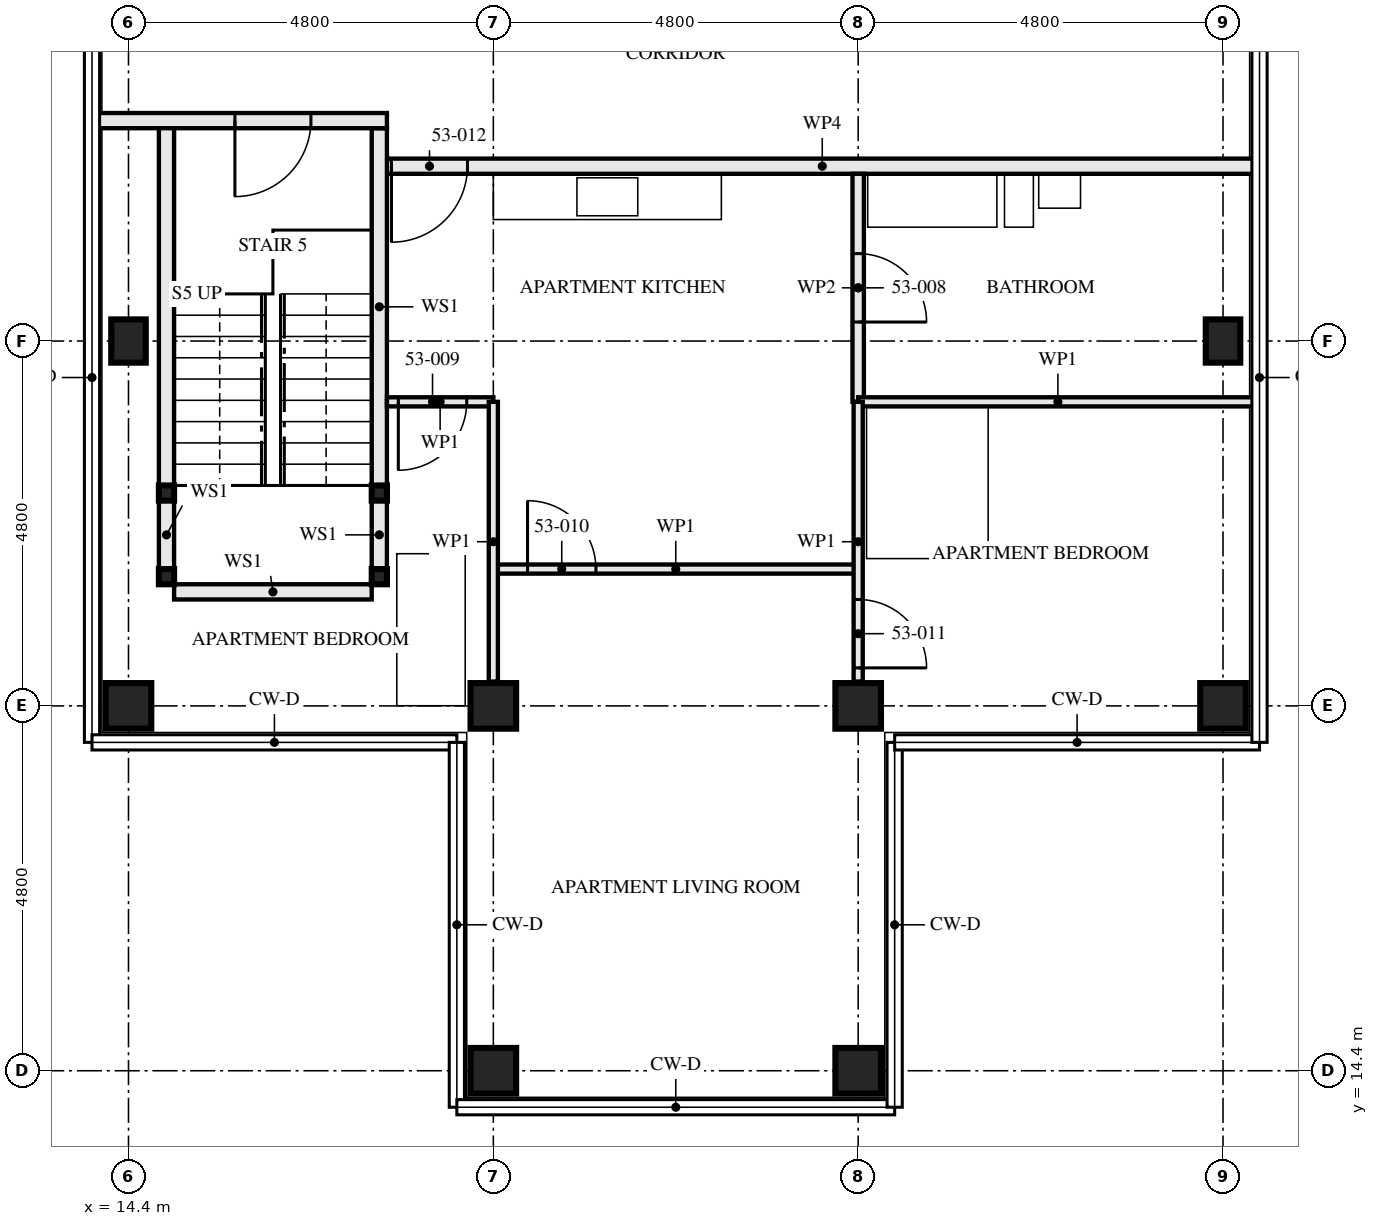
"""IFC4 building model, lengths in metres.
Left out: names, types, materials, properties, quantities, classifications, styles, units other than length and angle.
Written with IfcOpenShell. Run it as: python <this file> out.ifc"""

import sys

from ifc_helpers import new_model, si_unit, direction, frame, frame_2d, origin, origin_2d, place, context, subcontext, project, spatial, rectangle, hollow_rectangle, i_section, extrude, element, fill, save


model = new_model("IFC4")
c1 = context("Model", 3, precision=1e-05, world=origin(), true_north=direction((0.0, 1.0)))
c2 = subcontext(c1, "Body", "Model", "MODEL_VIEW")
j1 = project(units=[si_unit("LENGTHUNIT", "METRE"), si_unit("PLANEANGLEUNIT", "RADIAN")], contexts=[c1])
p1 = place(None, origin())
s1 = spatial("IfcSite", under=j1, at=p1, CompositionType="ELEMENT")
p2 = place(p1, origin())
s2 = spatial("IfcBuilding", under=s1, at=p2, CompositionType="ELEMENT")
p3 = place(p2, frame((0.0, 0.0, 194.5)))
s3 = spatial("IfcBuildingStorey", under=s2, at=p3, CompositionType="ELEMENT", Elevation=194.5)
p4 = place(p3, frame((14.4, 19.2, 0.0), z_axis=(0.0, 0.0, 1.0), x_axis=(0.0, 1.0, 0.0)))
e1 = element("IfcColumn", 1, at=p4, inside=s3, PredefinedType="COLUMN", context=c2, shape_type="SweptSolid", body=[
    extrude(hollow_rectangle(XDim=0.6, YDim=0.6, WallThickness=0.05, at=origin_2d()), origin(), (0.0, 0.0, 1.0), 3.5),
])
p5 = place(p3, frame((14.4, 24.0, 0.0), z_axis=(0.0, 0.0, 1.0), x_axis=(1.0, 0.0, 0.0)))
e2 = element("IfcColumn", 2, at=p5, inside=s3, PredefinedType="COLUMN", context=c2, shape_type="SweptSolid", body=[
    extrude(i_section(OverallWidth=0.454, OverallDepth=0.569, WebThickness=0.078, FlangeThickness=0.125, FilletRadius=0.015, at=origin_2d()), origin(), (0.0, 0.0, 1.0), 3.5),
])
for number, where, z_axis, x_axis in (
    (3, (19.2, 14.4, 0.0), (0.0, 0.0, 1.0), (0.0, 1.0, 0.0)),
    (4, (19.2, 19.2, 0.0), (0.0, 0.0, 1.0), (0.0, 1.0, 0.0)),
    (5, (24.0, 14.4, 0.0), (0.0, 0.0, 1.0), (0.0, 1.0, 0.0)),
    (6, (24.0, 19.2, 0.0), (0.0, 0.0, 1.0), (0.0, 1.0, 0.0)),
    (7, (28.8, 19.2, 0.0), (0.0, 0.0, 1.0), (0.0, 1.0, 0.0)),
):
    element("IfcColumn", number, at=place(p3, frame(where, z_axis=z_axis, x_axis=x_axis)), inside=s3, PredefinedType="COLUMN", context=c2, shape_type="SweptSolid", body=[
        extrude(hollow_rectangle(XDim=0.6, YDim=0.6, WallThickness=0.05, at=origin_2d()), origin(), (0.0, 0.0, 1.0), 3.5),
    ])
p6 = place(p3, frame((28.8, 24.0, 0.0), z_axis=(0.0, 0.0, 1.0), x_axis=(1.0, 0.0, 0.0)))
e8 = element("IfcColumn", 8, at=p6, inside=s3, PredefinedType="COLUMN", context=c2, shape_type="SweptSolid", body=[
    extrude(i_section(OverallWidth=0.454, OverallDepth=0.569, WebThickness=0.078, FlangeThickness=0.125, FilletRadius=0.015, at=origin_2d()), origin(), (0.0, 0.0, 1.0), 3.5),
])
for number, where, z_axis, x_axis in (
    (9, (14.9, 20.9, 0.0), (0.0, 0.0, 1.0), (1.0, 0.0, 0.0)),
    (10, (17.7, 20.9, 0.0), (0.0, 0.0, 1.0), (1.0, 0.0, 0.0)),
    (11, (14.9, 22.0, 0.0), (0.0, 0.0, 1.0), (1.0, 0.0, 0.0)),
    (12, (17.7, 22.0, 0.0), (0.0, 0.0, 1.0), (1.0, 0.0, 0.0)),
):
    element("IfcColumn", number, at=place(p3, frame(where, z_axis=z_axis, x_axis=x_axis)), inside=s3, PredefinedType="COLUMN", context=c2, shape_type="SweptSolid", body=[
        extrude(hollow_rectangle(XDim=0.2, YDim=0.2, WallThickness=0.008, at=origin_2d()), origin(), (0.0, 0.0, 1.0), 3.33),
    ])
p7 = place(p3, frame((14.9, 21.0, 0.0), z_axis=(0.0, 0.0, 1.0), x_axis=(0.0, 1.0, 0.0)))
e13 = element("IfcWall", 13, at=p7, inside=s3, PredefinedType="SOLIDWALL", context=c2, shape_type="SweptSolid", body=[
    extrude(rectangle(XDim=0.9, YDim=0.2, at=frame_2d((0.45, 0.0))), origin(), (0.0, 0.0, 1.0), 2.99),
])
p8 = place(p3, frame((14.9, 22.1, 0.0), z_axis=(0.0, 0.0, 1.0), x_axis=(0.0, 1.0, 0.0)))
e14 = element("IfcWall", 14, at=p8, inside=s3, PredefinedType="SOLIDWALL", context=c2, shape_type="SweptSolid", body=[
    extrude(rectangle(XDim=4.7, YDim=0.2, at=frame_2d((2.35, 0.0))), origin(), (0.0, 0.0, 1.0), 2.99),
])
p9 = place(p3, frame((17.7, 21.0, 0.0), z_axis=(0.0, 0.0, 1.0), x_axis=(0.0, 1.0, 0.0)))
e15 = element("IfcWall", 15, at=p9, inside=s3, PredefinedType="SOLIDWALL", context=c2, shape_type="SweptSolid", body=[
    extrude(rectangle(XDim=0.9, YDim=0.2, at=frame_2d((0.45, 0.0))), origin(), (0.0, 0.0, 1.0), 2.99),
])
p10 = place(p3, frame((17.7, 22.1, 0.0), z_axis=(0.0, 0.0, 1.0), x_axis=(0.0, 1.0, 0.0)))
e16 = element("IfcWall", 16, at=p10, inside=s3, PredefinedType="SOLIDWALL", context=c2, shape_type="SweptSolid", body=[
    extrude(rectangle(XDim=4.7, YDim=0.2, at=frame_2d((2.35, 0.0))), origin(), (0.0, 0.0, 1.0), 2.99),
])
p11 = place(p3, frame((15.0, 20.7, 0.0), z_axis=(0.0, 0.0, 1.0), x_axis=(1.0, 0.0, 0.0)))
e17 = element("IfcWall", 17, at=p11, inside=s3, PredefinedType="SOLIDWALL", context=c2, shape_type="SweptSolid", body=[
    extrude(rectangle(XDim=2.6, YDim=0.2, at=frame_2d((1.3, 0.0))), origin(), (0.0, 0.0, 1.0), 3.33),
])
p12 = place(p3, frame((13.945, 26.9, 0.0), z_axis=(0.0, 0.0, 1.0), x_axis=(1.0, 0.0, 0.0)))
e18 = element("IfcWall", 18, at=p12, inside=s3, PredefinedType="SOLIDWALL", context=c2, shape_type="SweptSolid", body=[
    extrude(rectangle(XDim=3.855, YDim=0.2, at=frame_2d((1.927, 0.0))), origin(), (0.0, 0.0, 1.0), 2.32),
])
p13 = place(p12, frame((1.855, 0.0, 0.0)))
e19 = element("IfcOpeningElement", 19, at=p13, cuts=e18, PredefinedType="OPENING", context=c2, shape_type="SweptSolid", body=[
    extrude(rectangle(XDim=1.0, YDim=2.1, at=frame_2d((0.5, 1.05))), frame((0.0, 0.111, 0.0), z_axis=(0.0, -1.0, 0.0), x_axis=(1.0, 0.0, 0.0)), (0.0, 0.0, 1.0), 0.221),
])
p14 = place(p3, frame((24.0, 23.2, 0.0), z_axis=(0.0, 0.0, 1.0), x_axis=(0.0, 1.0, 0.0)))
e20 = element("IfcWall", 20, at=p14, inside=s3, PredefinedType="PARTITIONING", context=c2, shape_type="SweptSolid", body=[
    extrude(rectangle(XDim=3.0, YDim=0.15, at=frame_2d((1.5, 0.0))), origin(), (0.0, 0.0, 1.0), 2.55),
])
p15 = place(p14, frame((1.05, 0.0, 0.0)))
e21 = element("IfcOpeningElement", 21, at=p15, cuts=e20, PredefinedType="OPENING", context=c2, shape_type="SweptSolid", body=[
    extrude(rectangle(XDim=0.9, YDim=2.1, at=frame_2d((0.45, 1.05))), frame((0.0, 0.085, 0.0), z_axis=(0.0, -1.0, 0.0), x_axis=(1.0, 0.0, 0.0)), (0.0, 0.0, 1.0), 0.171),
])
p16 = place(p3, frame((17.8, 23.2, 0.0), z_axis=(0.0, 0.0, 1.0), x_axis=(1.0, 0.0, 0.0)))
e22 = element("IfcWall", 22, at=p16, inside=s3, PredefinedType="PARTITIONING", context=c2, shape_type="SweptSolid", body=[
    extrude(rectangle(XDim=1.4, YDim=0.12, at=frame_2d((0.7, 0.0))), origin(), (0.0, 0.0, 1.0), 3.33),
])
p17 = place(p16, frame((0.15, 0.0, 0.0)))
e23 = element("IfcOpeningElement", 23, at=p17, cuts=e22, PredefinedType="OPENING", context=c2, shape_type="SweptSolid", body=[
    extrude(rectangle(XDim=0.9, YDim=2.1, at=frame_2d((0.45, 1.05))), frame((0.0, 0.071, 0.0), z_axis=(0.0, -1.0, 0.0), x_axis=(1.0, 0.0, 0.0)), (0.0, 0.0, 1.0), 0.141),
])
p18 = place(p3, frame((19.2, 21.0, 0.0), z_axis=(0.0, 0.0, 1.0), x_axis=(1.0, 0.0, 0.0)))
e24 = element("IfcWall", 24, at=p18, inside=s3, PredefinedType="PARTITIONING", context=c2, shape_type="SweptSolid", body=[
    extrude(rectangle(XDim=4.8, YDim=0.12, at=frame_2d((2.4, 0.0))), origin(), (0.0, 0.0, 1.0), 3.33),
])
p19 = place(p18, frame((0.45, 0.0, 0.0)))
e25 = element("IfcOpeningElement", 25, at=p19, cuts=e24, PredefinedType="OPENING", context=c2, shape_type="SweptSolid", body=[
    extrude(rectangle(XDim=0.9, YDim=2.1, at=frame_2d((0.45, 1.05))), frame((0.0, 0.071, 0.0), z_axis=(0.0, -1.0, 0.0), x_axis=(1.0, 0.0, 0.0)), (0.0, 0.0, 1.0), 0.141),
])
p20 = place(p3, frame((24.0, 23.2, 0.0), z_axis=(0.0, 0.0, 1.0), x_axis=(1.0, 0.0, 0.0)))
e26 = element("IfcWall", 26, at=p20, inside=s3, PredefinedType="PARTITIONING", context=c2, shape_type="SweptSolid", body=[
    extrude(rectangle(XDim=5.255, YDim=0.12, at=frame_2d((2.627, 0.0))), origin(), (0.0, 0.0, 1.0), 2.32),
])
p21 = place(p3, frame((19.2, 19.52, 0.0), z_axis=(0.0, 0.0, 1.0), x_axis=(0.0, 1.0, 0.0)))
e27 = element("IfcWall", 27, at=p21, inside=s3, PredefinedType="PARTITIONING", context=c2, shape_type="SweptSolid", body=[
    extrude(rectangle(XDim=3.68, YDim=0.12, at=frame_2d((1.84, 0.0))), origin(), (0.0, 0.0, 1.0), 2.55),
])
p22 = place(p3, frame((24.0, 19.52, 0.0), z_axis=(0.0, 0.0, 1.0), x_axis=(0.0, 1.0, 0.0)))
e28 = element("IfcWall", 28, at=p22, inside=s3, PredefinedType="PARTITIONING", context=c2, shape_type="SweptSolid", body=[
    extrude(rectangle(XDim=3.68, YDim=0.12, at=frame_2d((1.84, 0.0))), origin(), (0.0, 0.0, 1.0), 3.33),
])
p23 = place(p22, frame((0.18, 0.0, 0.0)))
e29 = element("IfcOpeningElement", 29, at=p23, cuts=e28, PredefinedType="OPENING", context=c2, shape_type="SweptSolid", body=[
    extrude(rectangle(XDim=0.9, YDim=2.1, at=frame_2d((0.45, 1.05))), frame((0.0, 0.071, 0.0), z_axis=(0.0, -1.0, 0.0), x_axis=(1.0, 0.0, 0.0)), (0.0, 0.0, 1.0), 0.141),
])
p24 = place(p3, frame((17.8, 26.3, 0.0), z_axis=(0.0, 0.0, 1.0), x_axis=(1.0, 0.0, 0.0)))
e30 = element("IfcWall", 30, at=p24, inside=s3, PredefinedType="PARTITIONING", context=c2, shape_type="SweptSolid", body=[
    extrude(rectangle(XDim=11.455, YDim=0.2, at=frame_2d((5.728, 0.0))), origin(), (0.0, 0.0, 1.0), 2.32),
])
p25 = place(p24, frame((0.06, 0.0, 0.0)))
e31 = element("IfcOpeningElement", 31, at=p25, cuts=e30, PredefinedType="OPENING", context=c2, shape_type="SweptSolid", body=[
    extrude(rectangle(XDim=1.0, YDim=2.1, at=frame_2d((0.5, 1.05))), frame((0.0, 0.111, 0.0), z_axis=(0.0, -1.0, 0.0), x_axis=(1.0, 0.0, 0.0)), (0.0, 0.0, 1.0), 0.221),
])
p26 = place(p13, frame((1.0, 0.0, 0.0), z_axis=(0.0, 0.0, 1.0), x_axis=(-1.0, 0.0, 0.0)))
e32 = element("IfcDoor", 32, at=p26, inside=s3, OperationType="SINGLE_SWING_LEFT", PredefinedType="DOOR", context=c2, shape_type="SweptSolid", body=[
    extrude(rectangle(XDim=1.0, YDim=2.1, at=frame_2d((0.5, 1.05))), frame((0.0, 0.032, 0.0), z_axis=(0.0, -1.0, 0.0), x_axis=(1.0, 0.0, 0.0)), (0.0, 0.0, 1.0), 0.064),
])
fill(e19, e32)
p27 = place(p15, frame((0.9, 0.0, 0.0), z_axis=(0.0, 0.0, 1.0), x_axis=(-1.0, 0.0, 0.0)))
e33 = element("IfcDoor", 33, at=p27, inside=s3, OperationType="SINGLE_SWING_LEFT", PredefinedType="DOOR", context=c2, shape_type="SweptSolid", body=[
    extrude(rectangle(XDim=0.9, YDim=2.1, at=frame_2d((0.45, 1.05))), frame((0.0, 0.022, 0.0), z_axis=(0.0, -1.0, 0.0), x_axis=(1.0, 0.0, 0.0)), (0.0, 0.0, 1.0), 0.044),
])
fill(e21, e33)
p28 = place(p17, frame((0.9, 0.0, 0.0), z_axis=(0.0, 0.0, 1.0), x_axis=(-1.0, 0.0, 0.0)))
e34 = element("IfcDoor", 34, at=p28, inside=s3, OperationType="SINGLE_SWING_LEFT", PredefinedType="DOOR", context=c2, shape_type="SweptSolid", body=[
    extrude(rectangle(XDim=0.9, YDim=2.1, at=frame_2d((0.45, 1.05))), frame((0.0, 0.022, 0.0), z_axis=(0.0, -1.0, 0.0), x_axis=(1.0, 0.0, 0.0)), (0.0, 0.0, 1.0), 0.044),
])
fill(e23, e34)
p29 = place(p19, origin())
e35 = element("IfcDoor", 35, at=p29, inside=s3, OperationType="SINGLE_SWING_RIGHT", PredefinedType="DOOR", context=c2, shape_type="SweptSolid", body=[
    extrude(rectangle(XDim=0.9, YDim=2.1, at=frame_2d((0.45, 1.05))), frame((0.0, 0.022, 0.0), z_axis=(0.0, -1.0, 0.0), x_axis=(1.0, 0.0, 0.0)), (0.0, 0.0, 1.0), 0.044),
])
fill(e25, e35)
p30 = place(p23, frame((0.9, 0.0, 0.0), z_axis=(0.0, 0.0, 1.0), x_axis=(-1.0, 0.0, 0.0)))
e36 = element("IfcDoor", 36, at=p30, inside=s3, OperationType="SINGLE_SWING_LEFT", PredefinedType="DOOR", context=c2, shape_type="SweptSolid", body=[
    extrude(rectangle(XDim=0.9, YDim=2.1, at=frame_2d((0.45, 1.05))), frame((0.0, 0.022, 0.0), z_axis=(0.0, -1.0, 0.0), x_axis=(1.0, 0.0, 0.0)), (0.0, 0.0, 1.0), 0.044),
])
fill(e29, e36)
p31 = place(p25, frame((1.0, 0.0, 0.0), z_axis=(0.0, 0.0, 1.0), x_axis=(-1.0, 0.0, 0.0)))
e37 = element("IfcDoor", 37, at=p31, inside=s3, OperationType="SINGLE_SWING_LEFT", PredefinedType="DOOR", context=c2, shape_type="SweptSolid", body=[
    extrude(rectangle(XDim=1.0, YDim=2.1, at=frame_2d((0.5, 1.05))), frame((0.0, 0.027, 0.0), z_axis=(0.0, -1.0, 0.0), x_axis=(1.0, 0.0, 0.0)), (0.0, 0.0, 1.0), 0.054),
])
fill(e31, e37)
save(model, sys.argv[1])
